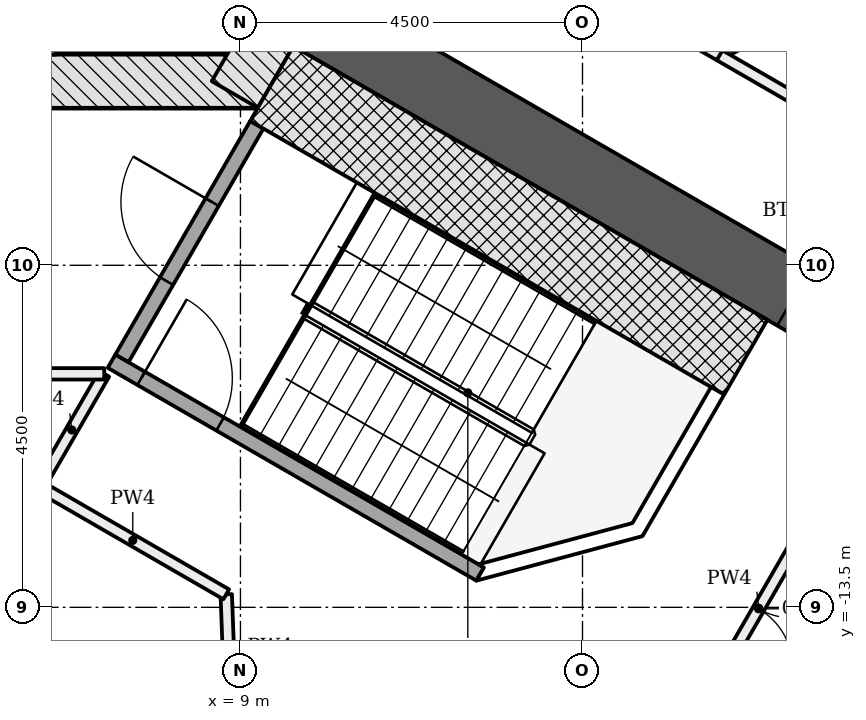
"""IFC4 building model, lengths in metres.
Left out: names, types, materials, properties, quantities, classifications, styles, units other than length and angle.
Written with IfcOpenShell. Run it as: python <this file> out.ifc"""

import sys

from ifc_helpers import new_model, si_unit, direction, frame, frame_2d, origin, place, context, subcontext, project, spatial, polyline, rectangle, outline, extrude, element, fill, save


model = new_model("IFC4")
c1 = context("Model", 3, precision=1e-05, world=origin(), true_north=direction((0.0, 1.0)))
c2 = subcontext(c1, "Body", "Model", "MODEL_VIEW")
j1 = project(units=[si_unit("LENGTHUNIT", "METRE"), si_unit("PLANEANGLEUNIT", "RADIAN")], contexts=[c1])
p1 = place(None, origin())
s1 = spatial("IfcSite", under=j1, at=p1, CompositionType="ELEMENT")
p2 = place(p1, origin())
s2 = spatial("IfcBuilding", under=s1, at=p2, CompositionType="ELEMENT")
p3 = place(p2, frame((0.0, 0.0, 10.5)))
s3 = spatial("IfcBuildingStorey", under=s2, at=p3, CompositionType="ELEMENT", Elevation=10.5)
p4 = place(p3, frame((-9.229, -6.578, -0.25), z_axis=(0.0, 0.0, 1.0), x_axis=(1.0, 0.0, 0.0)))
e1 = element("IfcWall", 1, at=p4, inside=s3, PredefinedType="SHEAR", context=c2, shape_type="SweptSolid", body=[
    extrude(rectangle(XDim=18.458, YDim=0.7, at=frame_2d((9.229, 0.0))), origin(), (0.0, 0.0, 1.0), 4.5),
])
p5 = place(p4, frame((3.304, 0.0, 0.25)))
e2 = element("IfcOpeningElement", 2, at=p5, cuts=e1, PredefinedType="OPENING", context=c2, shape_type="SweptSolid", body=[
    extrude(rectangle(XDim=1.1, YDim=2.1, at=frame_2d((0.55, 1.05))), frame((0.0, 0.36, 0.0), z_axis=(0.0, -1.0, 0.0), x_axis=(1.0, 0.0, 0.0)), (0.0, 0.0, 1.0), 0.72),
])
p6 = place(p4, frame((5.454, 0.0, 0.25)))
e3 = element("IfcOpeningElement", 3, at=p6, cuts=e1, PredefinedType="OPENING", context=c2, shape_type="SweptSolid", body=[
    extrude(rectangle(XDim=1.1, YDim=2.1, at=frame_2d((0.55, 1.05))), frame((0.0, 0.36, 0.0), z_axis=(0.0, -1.0, 0.0), x_axis=(1.0, 0.0, 0.0)), (0.0, 0.0, 1.0), 0.72),
])
p7 = place(p4, frame((7.604, 0.0, 0.25)))
e4 = element("IfcOpeningElement", 4, at=p7, cuts=e1, PredefinedType="OPENING", context=c2, shape_type="SweptSolid", body=[
    extrude(rectangle(XDim=1.1, YDim=2.1, at=frame_2d((0.55, 1.05))), frame((0.0, 0.36, 0.0), z_axis=(0.0, -1.0, 0.0), x_axis=(1.0, 0.0, 0.0)), (0.0, 0.0, 1.0), 0.72),
])
p8 = place(p4, frame((9.754, 0.0, 0.25)))
e5 = element("IfcOpeningElement", 5, at=p8, cuts=e1, PredefinedType="OPENING", context=c2, shape_type="SweptSolid", body=[
    extrude(rectangle(XDim=1.1, YDim=2.1, at=frame_2d((0.55, 1.05))), frame((0.0, 0.36, 0.0), z_axis=(0.0, -1.0, 0.0), x_axis=(1.0, 0.0, 0.0)), (0.0, 0.0, 1.0), 0.72),
])
p9 = place(p4, frame((11.904, 0.0, 0.25)))
e6 = element("IfcOpeningElement", 6, at=p9, cuts=e1, PredefinedType="OPENING", context=c2, shape_type="SweptSolid", body=[
    extrude(rectangle(XDim=1.1, YDim=2.1, at=frame_2d((0.55, 1.05))), frame((0.0, 0.36, 0.0), z_axis=(0.0, -1.0, 0.0), x_axis=(1.0, 0.0, 0.0)), (0.0, 0.0, 1.0), 0.72),
])
p10 = place(p4, frame((14.054, 0.0, 0.25)))
e7 = element("IfcOpeningElement", 7, at=p10, cuts=e1, PredefinedType="OPENING", context=c2, shape_type="SweptSolid", body=[
    extrude(rectangle(XDim=1.1, YDim=2.1, at=frame_2d((0.55, 1.05))), frame((0.0, 0.36, 0.0), z_axis=(0.0, -1.0, 0.0), x_axis=(1.0, 0.0, 0.0)), (0.0, 0.0, 1.0), 0.72),
])
p11 = place(p4, frame((1.079, 0.0, 0.25)))
e8 = element("IfcOpeningElement", 8, at=p11, cuts=e1, PredefinedType="OPENING", context=c2, shape_type="SweptSolid", body=[
    extrude(rectangle(XDim=0.9, YDim=2.1, at=frame_2d((0.45, 1.05))), frame((0.0, 0.36, 0.0), z_axis=(0.0, -1.0, 0.0), x_axis=(1.0, 0.0, 0.0)), (0.0, 0.0, 1.0), 0.72),
])
p12 = place(p3, frame((8.926, -6.753, -0.25), z_axis=(0.0, 0.0, 1.0), x_axis=(0.500042739161, 0.866000726912, 0.0)))
e9 = element("IfcWall", 9, at=p12, inside=s3, PredefinedType="SHEAR", context=c2, shape_type="SweptSolid", body=[
    extrude(rectangle(XDim=2.771, YDim=0.7, at=frame_2d((1.386, 0.0))), origin(), (0.0, 0.0, 1.0), 4.5),
])
p13 = place(p3, frame((9.922, -5.728, -0.25), z_axis=(0.0, 0.0, 1.0), x_axis=(0.866028046028, -0.499995423472, 0.0)))
e10 = element("IfcWall", 10, at=p13, inside=s3, PredefinedType="SHEAR", context=c2, shape_type="SweptSolid", body=[
    extrude(rectangle(XDim=14.633, YDim=0.9, at=frame_2d((7.316, 0.0))), origin(), (0.0, 0.0, 1.0), 4.5),
])
p14 = place(p13, frame((7.35, 0.0, 0.25)))
e11 = element("IfcOpeningElement", 11, at=p14, cuts=e10, PredefinedType="OPENING", context=c2, shape_type="SweptSolid", body=[
    extrude(rectangle(XDim=1.5, YDim=2.1, at=frame_2d((0.75, 1.05))), frame((0.0, 0.46, 0.0), z_axis=(0.0, -1.0, 0.0), x_axis=(1.0, 0.0, 0.0)), (0.0, 0.0, 1.0), 0.92),
])
p15 = place(p3, frame((6.45, -6.228, -0.25), z_axis=(0.0, 0.0, 1.0), x_axis=(0.0, 1.0, 0.0)))
e12 = element("IfcWall", 12, at=p15, inside=s3, PredefinedType="PARTITIONING", context=c2, shape_type="SweptSolid", body=[
    extrude(rectangle(XDim=2.5, YDim=0.25, at=frame_2d((1.25, 0.0))), origin(), (0.0, 0.0, 1.0), 4.5),
])
p16 = place(p3, frame((7.44, -10.226, -0.25), z_axis=(0.0, 0.0, 1.0), x_axis=(0.500022077904, 0.866012656725, 0.0)))
e13 = element("IfcWall", 13, at=p16, inside=s3, PredefinedType="SHEAR", context=c2, shape_type="SweptSolid", body=[
    extrude(rectangle(XDim=3.55, YDim=0.2, at=frame_2d((1.775, 0.0))), origin(), (0.0, 0.0, 1.0), 4.5),
])
p17 = place(p16, frame((1.175, 0.0, 0.25)))
e14 = element("IfcOpeningElement", 14, at=p17, cuts=e13, PredefinedType="OPENING", context=c2, shape_type="SweptSolid", body=[
    extrude(rectangle(XDim=1.2, YDim=2.1, at=frame_2d((0.6, 1.05))), frame((0.0, 0.11, 0.0), z_axis=(0.0, -1.0, 0.0), x_axis=(1.0, 0.0, 0.0)), (0.0, 0.0, 1.0), 0.22),
])
p18 = place(p3, frame((7.304, -10.262, -0.25), z_axis=(0.0, 0.0, 1.0), x_axis=(0.866026594901, -0.49999793692, 0.0)))
e15 = element("IfcWall", 15, at=p18, inside=s3, PredefinedType="SHEAR", context=c2, shape_type="SweptSolid", body=[
    extrude(rectangle(XDim=5.6, YDim=0.2, at=frame_2d((2.8, 0.0))), origin(), (0.0, 0.0, 1.0), 4.5),
])
p19 = place(p18, frame((0.45, 0.0, 0.25)))
e16 = element("IfcOpeningElement", 16, at=p19, cuts=e15, PredefinedType="OPENING", context=c2, shape_type="SweptSolid", body=[
    extrude(rectangle(XDim=1.2, YDim=2.1, at=frame_2d((0.6, 1.05))), frame((0.0, 0.11, 0.0), z_axis=(0.0, -1.0, 0.0), x_axis=(1.0, 0.0, 0.0)), (0.0, 0.0, 1.0), 0.22),
])
p20 = place(p3, frame((9.413, -6.61, -0.25), z_axis=(0.0, 0.0, 1.0), x_axis=(0.866018442252, -0.500012057535, 0.0)))
e17 = element("IfcWall", 17, at=p20, inside=s3, PredefinedType="SHEAR", context=c2, shape_type="SweptSolid", body=[
    extrude(rectangle(XDim=7.2, YDim=1.136, at=frame_2d((3.6, 0.0))), origin(), (0.0, 0.0, 1.0), 4.5),
])
p21 = place(p3, frame((0.0, 0.0, -0.25)))
e18 = element("IfcWall", 18, at=p21, inside=s3, PredefinedType="SHEAR", context=c2, shape_type="SweptSolid", body=[
    extrude(outline(polyline([(12.104, -13.149), (14.289, -12.563), (15.364, -10.701), (15.191, -10.601), (14.157, -12.392), (12.132, -12.934), (12.204, -12.976), (12.204, -12.976), (12.204, -12.976), (12.204, -12.976), (12.204, -12.976), (12.204, -12.976), (12.204, -12.976), (12.204, -12.976), (12.204, -12.976), (12.204, -12.976), (12.204, -12.976), (12.204, -12.976), (12.204, -12.976), (12.204, -12.976), (12.204, -12.976), (12.204, -12.976), (12.204, -12.976), (12.104, -13.149)])), origin(), (0.0, 0.0, 1.0), 4.5),
])
p22 = place(p3, frame((17.491, -10.618, 0.0), z_axis=(0.0, 0.0, 1.0), x_axis=(-0.499969057507, -0.866043267704, 0.0)))
e19 = element("IfcWall", 19, at=p22, inside=s3, PredefinedType="PARTITIONING", context=c2, shape_type="SweptSolid", body=[
    extrude(rectangle(XDim=6.685, YDim=0.15, at=frame_2d((3.342, 0.0))), origin(), (0.0, 0.0, 1.0), 3.638),
])
p23 = place(p22, frame((2.45, 0.0, 0.0)))
e20 = element("IfcOpeningElement", 20, at=p23, cuts=e19, PredefinedType="OPENING", context=c2, shape_type="SweptSolid", body=[
    extrude(rectangle(XDim=1.8, YDim=2.1, at=frame_2d((0.9, 1.05))), frame((0.0, 0.085, 0.0), z_axis=(0.0, -1.0, 0.0), x_axis=(1.0, 0.0, 0.0)), (0.0, 0.0, 1.0), 0.17),
])
p24 = place(p3, frame((8.865, -14.727, 0.0), z_axis=(0.0, 0.0, 1.0), x_axis=(-0.037173032443, 0.999308843981, 0.0)))
e21 = element("IfcWall", 21, at=p24, inside=s3, PredefinedType="PARTITIONING", context=c2, shape_type="SweptSolid", body=[
    extrude(rectangle(XDim=1.399, YDim=0.15, at=frame_2d((0.699, 0.0))), origin(), (0.0, 0.0, 1.0), 3.638),
])
p25 = place(p3, frame((8.813, -13.329, 0.0), z_axis=(0.0, 0.0, 1.0), x_axis=(-0.865804661524, 0.50038214205, 0.0)))
e22 = element("IfcWall", 22, at=p25, inside=s3, PredefinedType="PARTITIONING", context=c2, shape_type="SweptSolid", body=[
    extrude(rectangle(XDim=2.84, YDim=0.15, at=frame_2d((1.42, 0.0))), origin(), (0.0, 0.0, 1.0), 3.638),
])
p26 = place(p3, frame((6.354, -11.906, 0.0), z_axis=(0.0, 0.0, 1.0), x_axis=(0.500291894738, 0.865856812677, 0.0)))
e23 = element("IfcWall", 23, at=p26, inside=s3, PredefinedType="PARTITIONING", context=c2, shape_type="SweptSolid", body=[
    extrude(rectangle(XDim=1.707, YDim=0.15, at=frame_2d((0.854, 0.0))), origin(), (0.0, 0.0, 1.0), 4.25),
])
p27 = place(p3, frame((7.208, -10.428, 0.0), z_axis=(0.0, 0.0, 1.0), x_axis=(-1.0, 0.0, 0.0)))
e24 = element("IfcWall", 24, at=p27, inside=s3, PredefinedType="PARTITIONING", context=c2, shape_type="SweptSolid", body=[
    extrude(rectangle(XDim=2.861, YDim=0.15, at=frame_2d((1.431, 0.0))), origin(), (0.0, 0.0, 1.0), 3.638),
])
p28 = place(p27, frame((0.95, 0.0, 0.0)))
e25 = element("IfcOpeningElement", 25, at=p28, cuts=e24, PredefinedType="OPENING", context=c2, shape_type="SweptSolid", body=[
    extrude(rectangle(XDim=1.0, YDim=2.1, at=frame_2d((0.5, 1.05))), frame((0.0, 0.085, 0.0), z_axis=(0.0, -1.0, 0.0), x_axis=(1.0, 0.0, 0.0)), (0.0, 0.0, 1.0), 0.17),
])
p29 = place(p3, frame((19.942, -3.888, 0.0), z_axis=(0.0, 0.0, 1.0), x_axis=(-0.89239982182, -0.451245562877, 0.0)))
e26 = element("IfcWall", 26, at=p29, inside=s3, PredefinedType="PARTITIONING", context=c2, shape_type="SweptSolid", body=[
    extrude(rectangle(XDim=5.201, YDim=0.12, at=frame_2d((2.601, 0.0))), origin(), (0.0, 0.0, 1.0), 3.638),
])
p30 = place(p3, frame((15.295, -6.232, 0.0), z_axis=(0.0, 0.0, 1.0), x_axis=(0.865991915229, -0.500057999394, 0.0)))
e27 = element("IfcWall", 27, at=p30, inside=s3, PredefinedType="PARTITIONING", context=c2, shape_type="SweptSolid", body=[
    extrude(rectangle(XDim=4.094, YDim=0.15, at=frame_2d((2.047, 0.0))), origin(), (0.0, 0.0, 1.0), 3.638),
])
p31 = place(p30, frame((1.15, 0.0, 0.0)))
e28 = element("IfcOpeningElement", 28, at=p31, cuts=e27, PredefinedType="OPENING", context=c2, shape_type="SweptSolid", body=[
    extrude(rectangle(XDim=1.8, YDim=2.1, at=frame_2d((0.9, 1.05))), frame((0.0, 0.085, 0.0), z_axis=(0.0, -1.0, 0.0), x_axis=(1.0, 0.0, 0.0)), (0.0, 0.0, 1.0), 0.17),
])
p32 = place(p3, frame((14.078, -5.529, 0.0), z_axis=(0.0, 0.0, 1.0), x_axis=(0.865984561414, -0.500070734389, 0.0)))
e29 = element("IfcWall", 29, at=p32, inside=s3, PredefinedType="PARTITIONING", context=c2, shape_type="SweptSolid", body=[
    extrude(rectangle(XDim=1.416, YDim=0.15, at=frame_2d((0.708, 0.0))), origin(), (0.0, 0.0, 1.0), 3.638),
])
p33 = place(p17, origin())
e30 = element("IfcDoor", 30, at=p33, inside=s3, OperationType="SINGLE_SWING_RIGHT", PredefinedType="DOOR", context=c2, shape_type="SweptSolid", body=[
    extrude(rectangle(XDim=1.2, YDim=2.1, at=frame_2d((0.6, 1.05))), frame((0.0, 0.025, 0.0), z_axis=(0.0, -1.0, 0.0), x_axis=(1.0, 0.0, 0.0)), (0.0, 0.0, 1.0), 0.05),
])
fill(e14, e30)
p34 = place(p19, origin())
e31 = element("IfcDoor", 31, at=p34, inside=s3, OperationType="SINGLE_SWING_LEFT", PredefinedType="DOOR", context=c2, shape_type="SweptSolid", body=[
    extrude(rectangle(XDim=1.2, YDim=2.1, at=frame_2d((0.6, 1.05))), frame((0.0, 0.025, 0.0), z_axis=(0.0, -1.0, 0.0), x_axis=(1.0, 0.0, 0.0)), (0.0, 0.0, 1.0), 0.05),
])
fill(e16, e31)
p35 = place(p23, origin())
e32 = element("IfcDoor", 32, at=p35, inside=s3, OperationType="DOUBLE_DOOR_SINGLE_SWING", PredefinedType="DOOR", context=c2, shape_type="SweptSolid", body=[
    extrude(rectangle(XDim=1.8, YDim=2.1, at=frame_2d((0.9, 1.05))), frame((0.0, 0.025, 0.0), z_axis=(0.0, -1.0, 0.0), x_axis=(1.0, 0.0, 0.0)), (0.0, 0.0, 1.0), 0.05),
])
fill(e20, e32)
save(model, sys.argv[1])
